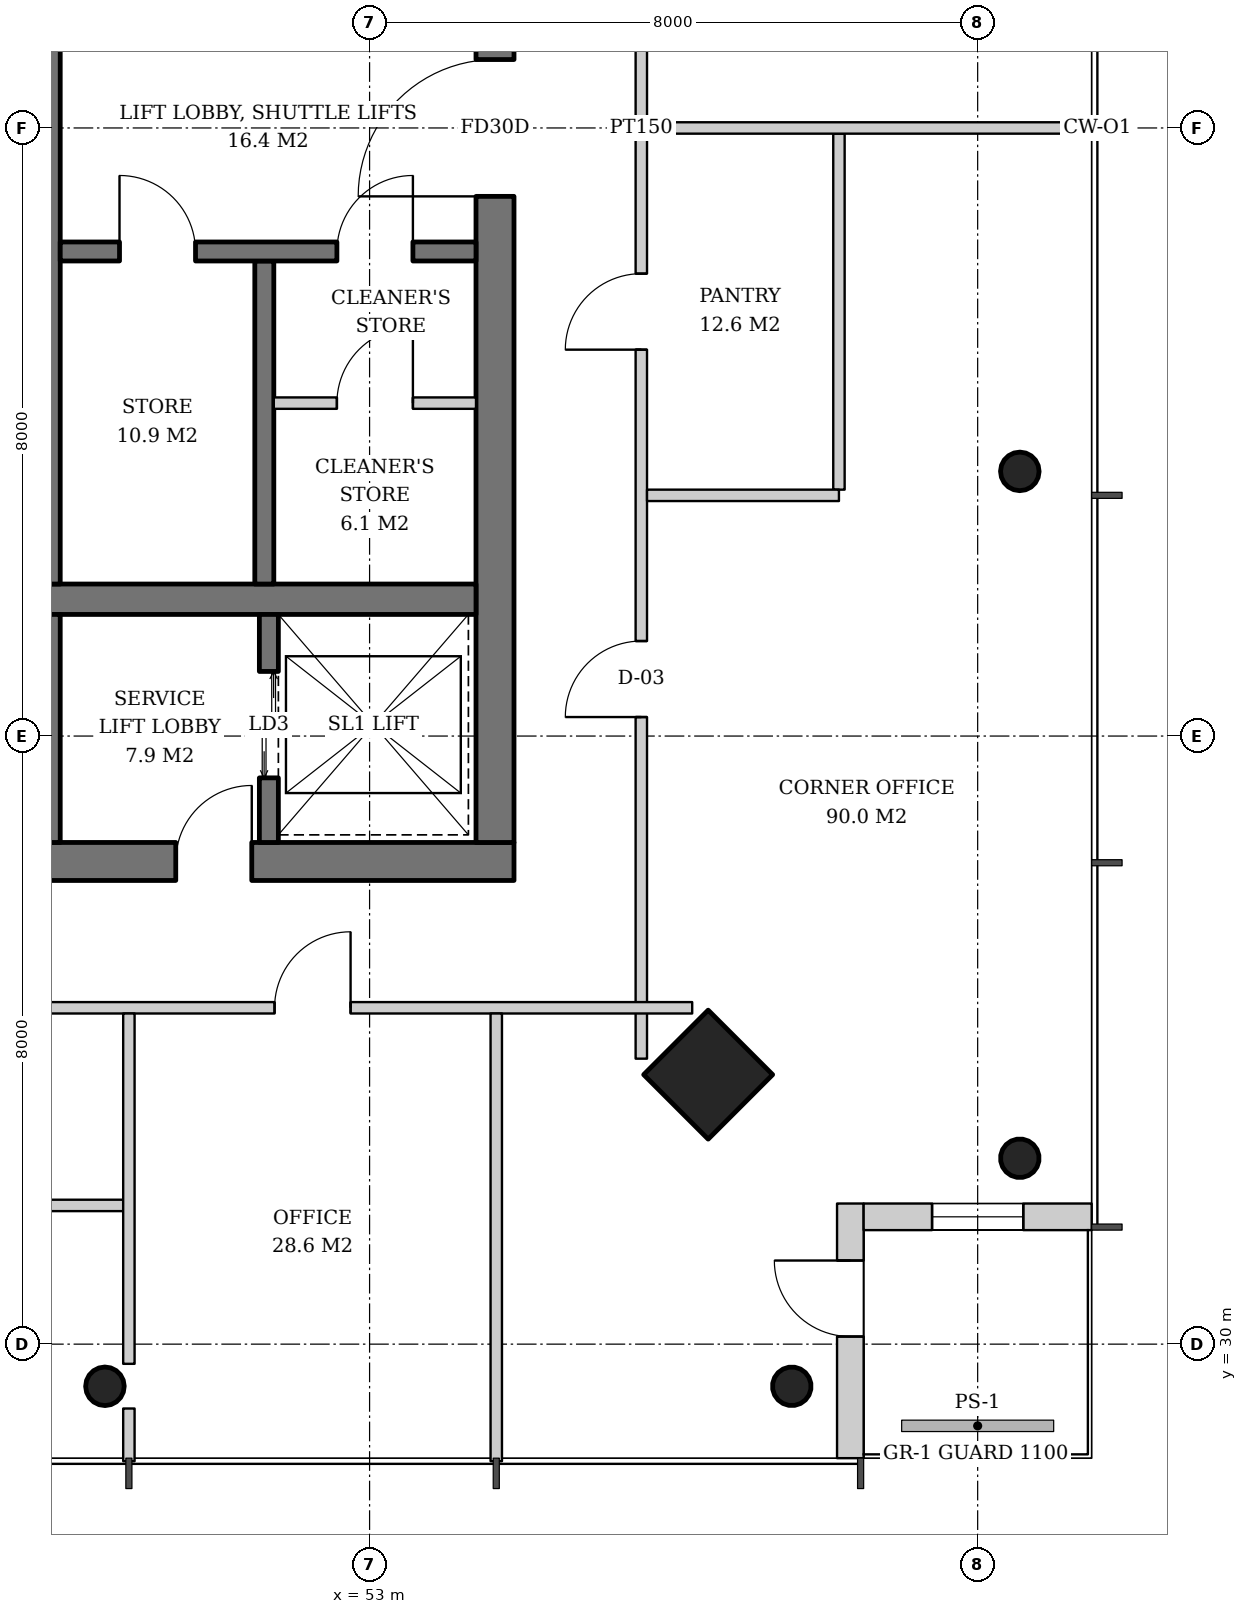
"""IFC4 building model, lengths in metres.
Left out: names, types, materials, properties, quantities, classifications, styles, units other than length and angle.
Written with IfcOpenShell. Run it as: python <this file> out.ifc"""

import sys

from ifc_helpers import new_model, si_unit, direction, frame, frame_2d, origin, origin_2d, place, context, subcontext, project, spatial, rectangle, hollow_circle, extrude, element, fill, save


model = new_model("IFC4")
c1 = context("Model", 3, precision=1e-05, world=origin(), true_north=direction((0.0, 1.0)))
c2 = subcontext(c1, "Body", "Model", "MODEL_VIEW")
j1 = project(units=[si_unit("LENGTHUNIT", "METRE"), si_unit("PLANEANGLEUNIT", "RADIAN")], contexts=[c1])
p1 = place(None, origin())
s1 = spatial("IfcSite", under=j1, at=p1, CompositionType="ELEMENT")
p2 = place(p1, origin())
s2 = spatial("IfcBuilding", under=s1, at=p2, CompositionType="ELEMENT")
p3 = place(p2, frame((0.0, 0.0, 252.8)))
s3 = spatial("IfcBuildingStorey", under=s2, at=p3, CompositionType="ELEMENT", Elevation=252.8)
p4 = place(p3, frame((61.593, 32.407, 0.0), z_axis=(-0.031898107953, 0.031898107953, 0.998981992539), x_axis=(-0.707106781187, -0.707106781187, 0.0)))
e1 = element("IfcColumn", 1, at=p4, inside=s3, PredefinedType="COLUMN", context=c2, shape_type="SweptSolid", body=[
    extrude(hollow_circle(Radius=0.254, WallThickness=0.02, at=origin_2d()), origin(), (0.0, 0.0, 1.0), 3.804),
])
p5 = place(p3, frame((61.593, 41.469, 0.0), z_axis=(-0.031912535354, 0.010658915229, 0.999433828532), x_axis=(-0.316800238982, -0.948492281772, 0.0)))
e2 = element("IfcColumn", 2, at=p5, inside=s3, PredefinedType="COLUMN", context=c2, shape_type="SweptSolid", body=[
    extrude(hollow_circle(Radius=0.254, WallThickness=0.02, at=origin_2d()), origin(), (0.0, 0.0, 1.0), 3.802),
])
p6 = place(p3, frame((57.493, 33.507, 0.0), z_axis=(-0.031962158256, 0.031962158256, 0.998977898093), x_axis=(-0.707106781187, -0.707106781187, 0.0)))
e3 = element("IfcColumn", 3, at=p6, inside=s3, PredefinedType="COLUMN", context=c2, shape_type="SweptSolid", body=[
    extrude(rectangle(XDim=1.2, YDim=1.2, at=origin_2d()), origin(), (0.0, 0.0, 1.0), 3.804),
])
p7 = place(p3, frame((58.593, 29.407, 0.0), z_axis=(-0.031898107953, 0.031898107953, 0.998981992539), x_axis=(-0.707106781187, -0.707106781187, 0.0)))
e4 = element("IfcColumn", 4, at=p7, inside=s3, PredefinedType="COLUMN", context=c2, shape_type="SweptSolid", body=[
    extrude(hollow_circle(Radius=0.254, WallThickness=0.02, at=origin_2d()), origin(), (0.0, 0.0, 1.0), 3.804),
])
p8 = place(p3, frame((49.531, 29.407, 0.0), z_axis=(-0.010658915229, 0.031912535354, 0.999433828532), x_axis=(-0.948492281772, -0.316800238982, 0.0)))
e5 = element("IfcColumn", 5, at=p8, inside=s3, PredefinedType="COLUMN", context=c2, shape_type="SweptSolid", body=[
    extrude(hollow_circle(Radius=0.254, WallThickness=0.02, at=origin_2d()), origin(), (0.0, 0.0, 1.0), 3.802),
])
p9 = place(p3, frame((35.1, 36.35, 0.0), z_axis=(0.0, 0.0, 1.0), x_axis=(1.0, 0.0, 0.0)))
e6 = element("IfcWall", 6, at=p9, inside=s3, PredefinedType="SHEAR", context=c2, shape_type="SweptSolid", body=[
    extrude(rectangle(XDim=19.8, YDim=0.5, at=frame_2d((9.9, 0.0))), origin(), (0.0, 0.0, 1.0), 3.8),
])
p10 = place(p9, frame((3.9, 0.0, 0.0)))
e7 = element("IfcOpeningElement", 7, at=p10, cuts=e6, PredefinedType="OPENING", context=c2, shape_type="SweptSolid", body=[
    extrude(rectangle(XDim=1.0, YDim=2.1, at=frame_2d((0.5, 1.05))), frame((0.0, 0.26, 0.0), z_axis=(0.0, -1.0, 0.0), x_axis=(1.0, 0.0, 0.0)), (0.0, 0.0, 1.0), 0.52),
])
p11 = place(p9, frame((15.35, 0.0, 0.0)))
e8 = element("IfcOpeningElement", 8, at=p11, cuts=e6, PredefinedType="OPENING", context=c2, shape_type="SweptSolid", body=[
    extrude(rectangle(XDim=1.0, YDim=2.1, at=frame_2d((0.5, 1.05))), frame((0.0, 0.26, 0.0), z_axis=(0.0, -1.0, 0.0), x_axis=(1.0, 0.0, 0.0)), (0.0, 0.0, 1.0), 0.52),
])
p12 = place(p3, frame((54.65, 36.6, 0.0), z_axis=(0.0, 0.0, 1.0), x_axis=(0.0, 1.0, 0.0)))
e9 = element("IfcWall", 9, at=p12, inside=s3, PredefinedType="SHEAR", context=c2, shape_type="SweptSolid", body=[
    extrude(rectangle(XDim=18.8, YDim=0.5, at=frame_2d((9.4, 0.0))), origin(), (0.0, 0.0, 1.0), 3.8),
])
p13 = place(p12, frame((8.5, 0.0, 0.0)))
e10 = element("IfcOpeningElement", 10, at=p13, cuts=e9, PredefinedType="OPENING", context=c2, shape_type="SweptSolid", body=[
    extrude(rectangle(XDim=1.8, YDim=2.4, at=frame_2d((0.9, 1.2))), frame((0.0, 0.26, 0.0), z_axis=(0.0, -1.0, 0.0), x_axis=(1.0, 0.0, 0.0)), (0.0, 0.0, 1.0), 0.52),
])
p14 = place(p3, frame((35.6, 39.8, 0.0), z_axis=(0.0, 0.0, 1.0), x_axis=(1.0, 0.0, 0.0)))
e11 = element("IfcWall", 11, at=p14, inside=s3, PredefinedType="SHEAR", context=c2, shape_type="SweptSolid", body=[
    extrude(rectangle(XDim=18.8, YDim=0.4, at=frame_2d((9.4, 0.0))), origin(), (0.0, 0.0, 1.0), 3.8),
])
p15 = place(p3, frame((48.73, 36.6, 0.0), z_axis=(0.0, 0.0, 1.0), x_axis=(0.0, 1.0, 0.0)))
e12 = element("IfcWall", 12, at=p15, inside=s3, PredefinedType="SHEAR", context=c2, shape_type="SweptSolid", body=[
    extrude(rectangle(XDim=3.0, YDim=0.4, at=frame_2d((1.5, 0.0))), origin(), (0.0, 0.0, 1.0), 3.8),
])
p16 = place(p3, frame((48.73, 40.0, 0.0), z_axis=(0.0, 0.0, 1.0), x_axis=(0.0, 1.0, 0.0)))
e13 = element("IfcWall", 13, at=p16, inside=s3, PredefinedType="SHEAR", context=c2, shape_type="SweptSolid", body=[
    extrude(rectangle(XDim=12.0, YDim=0.4, at=frame_2d((6.0, 0.0))), origin(), (0.0, 0.0, 1.0), 3.8),
])
p17 = place(p3, frame((59.325, 28.5, 0.0), z_axis=(0.0, 0.0, 1.0), x_axis=(0.0, 1.0, 0.0)))
e14 = element("IfcWall", 14, at=p17, inside=s3, PredefinedType="SOLIDWALL", context=c2, shape_type="SweptSolid", body=[
    extrude(rectangle(XDim=3.35, YDim=0.35, at=frame_2d((1.675, 0.0))), origin(), (0.0, 0.0, 1.0), 3.62),
])
p18 = place(p17, frame((1.6, 0.0, 0.0)))
e15 = element("IfcOpeningElement", 15, at=p18, cuts=e14, PredefinedType="OPENING", context=c2, shape_type="SweptSolid", body=[
    extrude(rectangle(XDim=1.0, YDim=2.4, at=frame_2d((0.5, 1.2))), frame((0.0, 0.185, 0.0), z_axis=(0.0, -1.0, 0.0), x_axis=(1.0, 0.0, 0.0)), (0.0, 0.0, 1.0), 0.37),
])
p19 = place(p3, frame((59.5, 31.675, 0.0), z_axis=(0.0, 0.0, 1.0), x_axis=(1.0, 0.0, 0.0)))
e16 = element("IfcWall", 16, at=p19, inside=s3, PredefinedType="SOLIDWALL", context=c2, shape_type="SweptSolid", body=[
    extrude(rectangle(XDim=3.0, YDim=0.35, at=frame_2d((1.5, 0.0))), origin(), (0.0, 0.0, 1.0), 3.62),
])
p20 = place(p19, frame((0.9, 0.0, 0.6)))
e17 = element("IfcOpeningElement", 17, at=p20, cuts=e16, PredefinedType="OPENING", context=c2, shape_type="SweptSolid", body=[
    extrude(rectangle(XDim=1.2, YDim=2.55, at=frame_2d((0.6, 1.275))), frame((0.0, 0.185, 0.0), z_axis=(0.0, -1.0, 0.0), x_axis=(1.0, 0.0, 0.0)), (0.0, 0.0, 1.0), 0.37),
])
p21 = place(p3, frame((51.675, 36.6, 0.0), z_axis=(0.0, 0.0, 1.0), x_axis=(0.0, 1.0, 0.0)))
e18 = element("IfcWall", 18, at=p21, inside=s3, PredefinedType="SHEAR", context=c2, shape_type="SweptSolid", body=[
    extrude(rectangle(XDim=3.0, YDim=0.25, at=frame_2d((1.5, 0.0))), origin(), (0.0, 0.0, 1.0), 3.8),
])
p22 = place(p21, frame((0.85, 0.0, 0.0)))
e19 = element("IfcOpeningElement", 19, at=p22, cuts=e18, PredefinedType="OPENING", context=c2, shape_type="SweptSolid", body=[
    extrude(rectangle(XDim=1.4, YDim=2.4, at=frame_2d((0.7, 1.2))), frame((0.0, 0.135, 0.0), z_axis=(0.0, -1.0, 0.0), x_axis=(1.0, 0.0, 0.0)), (0.0, 0.0, 1.0), 0.27),
])
p23 = place(p3, frame((51.615, 44.25, 0.0), z_axis=(0.0, 0.0, 1.0), x_axis=(0.0, -1.0, 0.0)))
e20 = element("IfcWall", 20, at=p23, inside=s3, PredefinedType="SHEAR", context=c2, shape_type="SweptSolid", body=[
    extrude(rectangle(XDim=4.25, YDim=0.25, at=frame_2d((2.125, 0.0))), origin(), (0.0, 0.0, 1.0), 3.8),
])
p24 = place(p3, frame((48.93, 44.375, 0.0), z_axis=(0.0, 0.0, 1.0), x_axis=(1.0, 0.0, 0.0)))
e21 = element("IfcWall", 21, at=p24, inside=s3, PredefinedType="SHEAR", context=c2, shape_type="SweptSolid", body=[
    extrude(rectangle(XDim=5.47, YDim=0.25, at=frame_2d((2.735, 0.0))), origin(), (0.0, 0.0, 1.0), 3.8),
])
p25 = place(p24, frame((0.78, 0.0, 0.0)))
e22 = element("IfcOpeningElement", 22, at=p25, cuts=e21, PredefinedType="OPENING", context=c2, shape_type="SweptSolid", body=[
    extrude(rectangle(XDim=1.0, YDim=2.1, at=frame_2d((0.5, 1.05))), frame((0.0, 0.135, 0.0), z_axis=(0.0, -1.0, 0.0), x_axis=(1.0, 0.0, 0.0)), (0.0, 0.0, 1.0), 0.27),
])
p26 = place(p24, frame((3.64, 0.0, 0.0)))
e23 = element("IfcOpeningElement", 23, at=p26, cuts=e21, PredefinedType="OPENING", context=c2, shape_type="SweptSolid", body=[
    extrude(rectangle(XDim=1.0, YDim=2.1, at=frame_2d((0.5, 1.05))), frame((0.0, 0.135, 0.0), z_axis=(0.0, -1.0, 0.0), x_axis=(1.0, 0.0, 0.0)), (0.0, 0.0, 1.0), 0.27),
])
p27 = place(p3, frame((51.74, 42.38, 0.0), z_axis=(0.0, 0.0, 1.0), x_axis=(1.0, 0.0, 0.0)))
e24 = element("IfcWall", 24, at=p27, inside=s3, PredefinedType="SOLIDWALL", context=c2, shape_type="SweptSolid", body=[
    extrude(rectangle(XDim=2.66, YDim=0.15, at=frame_2d((1.33, 0.0))), origin(), (0.0, 0.0, 1.0), 3.62),
])
p28 = place(p27, frame((0.83, 0.0, 0.0)))
e25 = element("IfcOpeningElement", 25, at=p28, cuts=e24, PredefinedType="OPENING", context=c2, shape_type="SweptSolid", body=[
    extrude(rectangle(XDim=1.0, YDim=2.1, at=frame_2d((0.5, 1.05))), frame((0.0, 0.085, 0.0), z_axis=(0.0, -1.0, 0.0), x_axis=(1.0, 0.0, 0.0)), (0.0, 0.0, 1.0), 0.17),
])
p29 = place(p3, frame((59.175, 41.242, 0.0), z_axis=(0.0, 0.0, 1.0), x_axis=(0.0, 1.0, 0.0)))
e26 = element("IfcWall", 26, at=p29, inside=s3, PredefinedType="PARTITIONING", context=c2, shape_type="SweptSolid", body=[
    extrude(rectangle(XDim=4.683, YDim=0.15, at=frame_2d((2.342, 0.0))), origin(), (0.0, 0.0, 1.0), 3.12),
])
p30 = place(p3, frame((56.575, 33.756, 0.0), z_axis=(0.0, 0.0, 1.0), x_axis=(0.0, 1.0, 0.0)))
e27 = element("IfcWall", 27, at=p30, inside=s3, PredefinedType="PARTITIONING", context=c2, shape_type="SweptSolid", body=[
    extrude(rectangle(XDim=24.489, YDim=0.15, at=frame_2d((12.244, 0.0))), origin(), (0.0, 0.0, 1.0), 3.02),
])
p31 = place(p30, frame((4.494, 0.0, 0.0)))
e28 = element("IfcOpeningElement", 28, at=p31, cuts=e27, PredefinedType="OPENING", context=c2, shape_type="SweptSolid", body=[
    extrude(rectangle(XDim=1.0, YDim=2.1, at=frame_2d((0.5, 1.05))), frame((0.0, 0.085, 0.0), z_axis=(0.0, -1.0, 0.0), x_axis=(1.0, 0.0, 0.0)), (0.0, 0.0, 1.0), 0.17),
])
p32 = place(p30, frame((9.328, 0.0, 0.0)))
e29 = element("IfcOpeningElement", 29, at=p32, cuts=e27, PredefinedType="OPENING", context=c2, shape_type="SweptSolid", body=[
    extrude(rectangle(XDim=1.0, YDim=2.1, at=frame_2d((0.5, 1.05))), frame((0.0, 0.085, 0.0), z_axis=(0.0, -1.0, 0.0), x_axis=(1.0, 0.0, 0.0)), (0.0, 0.0, 1.0), 0.17),
])
p33 = place(p30, frame((14.161, 0.0, 0.0)))
e30 = element("IfcOpeningElement", 30, at=p33, cuts=e27, PredefinedType="OPENING", context=c2, shape_type="SweptSolid", body=[
    extrude(rectangle(XDim=1.0, YDim=2.1, at=frame_2d((0.5, 1.05))), frame((0.0, 0.085, 0.0), z_axis=(0.0, -1.0, 0.0), x_axis=(1.0, 0.0, 0.0)), (0.0, 0.0, 1.0), 0.17),
])
p34 = place(p30, frame((18.994, 0.0, 0.0)))
e31 = element("IfcOpeningElement", 31, at=p34, cuts=e27, PredefinedType="OPENING", context=c2, shape_type="SweptSolid", body=[
    extrude(rectangle(XDim=1.0, YDim=2.1, at=frame_2d((0.5, 1.05))), frame((0.0, 0.085, 0.0), z_axis=(0.0, -1.0, 0.0), x_axis=(1.0, 0.0, 0.0)), (0.0, 0.0, 1.0), 0.17),
])
p35 = place(p3, frame((56.65, 41.167, 0.0), z_axis=(0.0, 0.0, 1.0), x_axis=(1.0, 0.0, 0.0)))
e32 = element("IfcWall", 32, at=p35, inside=s3, PredefinedType="PARTITIONING", context=c2, shape_type="SweptSolid", body=[
    extrude(rectangle(XDim=2.525, YDim=0.15, at=frame_2d((1.263, 0.0))), origin(), (0.0, 0.0, 1.0), 3.62),
])
p36 = place(p3, frame((56.65, 46.0, 0.0), z_axis=(0.0, 0.0, 1.0), x_axis=(1.0, 0.0, 0.0)))
e33 = element("IfcWall", 33, at=p36, inside=s3, PredefinedType="PARTITIONING", context=c2, shape_type="SweptSolid", body=[
    extrude(rectangle(XDim=5.89, YDim=0.15, at=frame_2d((2.945, 0.0))), origin(), (0.0, 0.0, 1.0), 3.12),
])
p37 = place(p3, frame((45.075, 31.825, 0.0), z_axis=(0.0, 0.0, 1.0), x_axis=(1.0, 0.0, 0.0)))
e34 = element("IfcWall", 34, at=p37, inside=s3, PredefinedType="PARTITIONING", context=c2, shape_type="SweptSolid", body=[
    extrude(rectangle(XDim=4.683, YDim=0.15, at=frame_2d((2.342, 0.0))), origin(), (0.0, 0.0, 1.0), 3.12),
])
p38 = place(p3, frame((32.756, 34.425, 0.0), z_axis=(0.0, 0.0, 1.0), x_axis=(1.0, 0.0, 0.0)))
e35 = element("IfcWall", 35, at=p38, inside=s3, PredefinedType="PARTITIONING", context=c2, shape_type="SweptSolid", body=[
    extrude(rectangle(XDim=24.489, YDim=0.15, at=frame_2d((12.244, 0.0))), origin(), (0.0, 0.0, 1.0), 3.02),
])
p39 = place(p38, frame((4.494, 0.0, 0.0)))
e36 = element("IfcOpeningElement", 36, at=p39, cuts=e35, PredefinedType="OPENING", context=c2, shape_type="SweptSolid", body=[
    extrude(rectangle(XDim=1.0, YDim=2.1, at=frame_2d((0.5, 1.05))), frame((0.0, 0.085, 0.0), z_axis=(0.0, -1.0, 0.0), x_axis=(1.0, 0.0, 0.0)), (0.0, 0.0, 1.0), 0.17),
])
p40 = place(p38, frame((9.328, 0.0, 0.0)))
e37 = element("IfcOpeningElement", 37, at=p40, cuts=e35, PredefinedType="OPENING", context=c2, shape_type="SweptSolid", body=[
    extrude(rectangle(XDim=1.0, YDim=2.1, at=frame_2d((0.5, 1.05))), frame((0.0, 0.085, 0.0), z_axis=(0.0, -1.0, 0.0), x_axis=(1.0, 0.0, 0.0)), (0.0, 0.0, 1.0), 0.17),
])
p41 = place(p38, frame((14.161, 0.0, 0.0)))
e38 = element("IfcOpeningElement", 38, at=p41, cuts=e35, PredefinedType="OPENING", context=c2, shape_type="SweptSolid", body=[
    extrude(rectangle(XDim=1.0, YDim=2.1, at=frame_2d((0.5, 1.05))), frame((0.0, 0.085, 0.0), z_axis=(0.0, -1.0, 0.0), x_axis=(1.0, 0.0, 0.0)), (0.0, 0.0, 1.0), 0.17),
])
p42 = place(p38, frame((18.994, 0.0, 0.0)))
e39 = element("IfcOpeningElement", 39, at=p42, cuts=e35, PredefinedType="OPENING", context=c2, shape_type="SweptSolid", body=[
    extrude(rectangle(XDim=1.0, YDim=2.1, at=frame_2d((0.5, 1.05))), frame((0.0, 0.085, 0.0), z_axis=(0.0, -1.0, 0.0), x_axis=(1.0, 0.0, 0.0)), (0.0, 0.0, 1.0), 0.17),
])
p43 = place(p3, frame((49.833, 34.35, 0.0), z_axis=(0.0, 0.0, 1.0), x_axis=(0.0, -1.0, 0.0)))
e40 = element("IfcWall", 40, at=p43, inside=s3, PredefinedType="PARTITIONING", context=c2, shape_type="SweptSolid", body=[
    extrude(rectangle(XDim=4.609, YDim=0.15, at=frame_2d((2.305, 0.0))), origin(), (0.0, 0.0, 1.0), 3.62),
])
p44 = place(p3, frame((49.833, 29.153, 0.0), z_axis=(0.0, 0.0, 1.0), x_axis=(0.0, -1.0, 0.0)))
e41 = element("IfcWall", 41, at=p44, inside=s3, PredefinedType="PARTITIONING", context=c2, shape_type="SweptSolid", body=[
    extrude(rectangle(XDim=0.693, YDim=0.15, at=frame_2d((0.347, 0.0))), origin(), (0.0, 0.0, 1.0), 3.62),
])
p45 = place(p3, frame((54.667, 34.35, 0.0), z_axis=(0.0, 0.0, 1.0), x_axis=(0.0, -1.0, 0.0)))
e42 = element("IfcWall", 42, at=p45, inside=s3, PredefinedType="PARTITIONING", context=c2, shape_type="SweptSolid", body=[
    extrude(rectangle(XDim=5.89, YDim=0.15, at=frame_2d((2.945, 0.0))), origin(), (0.0, 0.0, 1.0), 3.12),
])
p46 = place(p18, origin())
e43 = element("IfcDoor", 43, at=p46, inside=s3, OperationType="SINGLE_SWING_RIGHT", PredefinedType="DOOR", context=c2, shape_type="SweptSolid", body=[
    extrude(rectangle(XDim=1.0, YDim=2.4, at=frame_2d((0.5, 1.2))), frame((0.0, 0.025, 0.0), z_axis=(0.0, -1.0, 0.0), x_axis=(1.0, 0.0, 0.0)), (0.0, 0.0, 1.0), 0.05),
])
fill(e15, e43)
p47 = place(p20, origin())
e44 = element("IfcWindow", 44, at=p47, inside=s3, PartitioningType="SINGLE_PANEL", PredefinedType="WINDOW", context=c2, shape_type="SweptSolid", body=[
    extrude(rectangle(XDim=1.2, YDim=2.55, at=frame_2d((0.6, 1.275))), frame((0.0, 0.03, 0.0), z_axis=(0.0, -1.0, 0.0), x_axis=(1.0, 0.0, 0.0)), (0.0, 0.0, 1.0), 0.06),
])
fill(e17, e44)
p48 = place(p22, origin())
e45 = element("IfcDoor", 45, at=p48, inside=s3, OperationType="DOUBLE_DOOR_SLIDING", PredefinedType="DOOR", context=c2, shape_type="SweptSolid", body=[
    extrude(rectangle(XDim=1.4, YDim=2.4, at=frame_2d((0.7, 1.2))), frame((0.0, 0.025, 0.0), z_axis=(0.0, -1.0, 0.0), x_axis=(1.0, 0.0, 0.0)), (0.0, 0.0, 1.0), 0.05),
])
fill(e19, e45)
p49 = place(p25, origin())
e46 = element("IfcDoor", 46, at=p49, inside=s3, OperationType="SINGLE_SWING_LEFT", PredefinedType="DOOR", context=c2, shape_type="SweptSolid", body=[
    extrude(rectangle(XDim=1.0, YDim=2.1, at=frame_2d((0.5, 1.05))), frame((0.0, 0.025, 0.0), z_axis=(0.0, -1.0, 0.0), x_axis=(1.0, 0.0, 0.0)), (0.0, 0.0, 1.0), 0.05),
])
fill(e22, e46)
p50 = place(p26, origin())
e47 = element("IfcDoor", 47, at=p50, inside=s3, OperationType="SINGLE_SWING_RIGHT", PredefinedType="DOOR", context=c2, shape_type="SweptSolid", body=[
    extrude(rectangle(XDim=1.0, YDim=2.1, at=frame_2d((0.5, 1.05))), frame((0.0, 0.025, 0.0), z_axis=(0.0, -1.0, 0.0), x_axis=(1.0, 0.0, 0.0)), (0.0, 0.0, 1.0), 0.05),
])
fill(e23, e47)
p51 = place(p28, origin())
e48 = element("IfcDoor", 48, at=p51, inside=s3, OperationType="SINGLE_SWING_RIGHT", PredefinedType="DOOR", context=c2, shape_type="SweptSolid", body=[
    extrude(rectangle(XDim=1.0, YDim=2.1, at=frame_2d((0.5, 1.05))), frame((0.0, 0.025, 0.0), z_axis=(0.0, -1.0, 0.0), x_axis=(1.0, 0.0, 0.0)), (0.0, 0.0, 1.0), 0.05),
])
fill(e25, e48)
p52 = place(p13, origin())
e49 = element("IfcDoor", 49, at=p52, inside=s3, OperationType="DOUBLE_DOOR_SINGLE_SWING", PredefinedType="DOOR", context=c2, shape_type="SweptSolid", body=[
    extrude(rectangle(XDim=1.8, YDim=2.4, at=frame_2d((0.9, 1.2))), frame((0.0, 0.025, 0.0), z_axis=(0.0, -1.0, 0.0), x_axis=(1.0, 0.0, 0.0)), (0.0, 0.0, 1.0), 0.05),
])
fill(e10, e49)
p53 = place(p11, origin())
e50 = element("IfcDoor", 50, at=p53, inside=s3, OperationType="SINGLE_SWING_RIGHT", PredefinedType="DOOR", context=c2, shape_type="SweptSolid", body=[
    extrude(rectangle(XDim=1.0, YDim=2.1, at=frame_2d((0.5, 1.05))), frame((0.0, 0.025, 0.0), z_axis=(0.0, -1.0, 0.0), x_axis=(1.0, 0.0, 0.0)), (0.0, 0.0, 1.0), 0.05),
])
fill(e8, e50)
p54 = place(p31, origin())
e51 = element("IfcDoor", 51, at=p54, inside=s3, OperationType="SINGLE_SWING_LEFT", PredefinedType="DOOR", context=c2, shape_type="SweptSolid", body=[
    extrude(rectangle(XDim=1.0, YDim=2.1, at=frame_2d((0.5, 1.05))), frame((0.0, 0.025, 0.0), z_axis=(0.0, -1.0, 0.0), x_axis=(1.0, 0.0, 0.0)), (0.0, 0.0, 1.0), 0.05),
])
fill(e28, e51)
p55 = place(p32, origin())
e52 = element("IfcDoor", 52, at=p55, inside=s3, OperationType="SINGLE_SWING_LEFT", PredefinedType="DOOR", context=c2, shape_type="SweptSolid", body=[
    extrude(rectangle(XDim=1.0, YDim=2.1, at=frame_2d((0.5, 1.05))), frame((0.0, 0.025, 0.0), z_axis=(0.0, -1.0, 0.0), x_axis=(1.0, 0.0, 0.0)), (0.0, 0.0, 1.0), 0.05),
])
fill(e29, e52)
p56 = place(p42, origin())
e53 = element("IfcDoor", 53, at=p56, inside=s3, OperationType="SINGLE_SWING_RIGHT", PredefinedType="DOOR", context=c2, shape_type="SweptSolid", body=[
    extrude(rectangle(XDim=1.0, YDim=2.1, at=frame_2d((0.5, 1.05))), frame((0.0, 0.025, 0.0), z_axis=(0.0, -1.0, 0.0), x_axis=(1.0, 0.0, 0.0)), (0.0, 0.0, 1.0), 0.05),
])
fill(e39, e53)
save(model, sys.argv[1])
